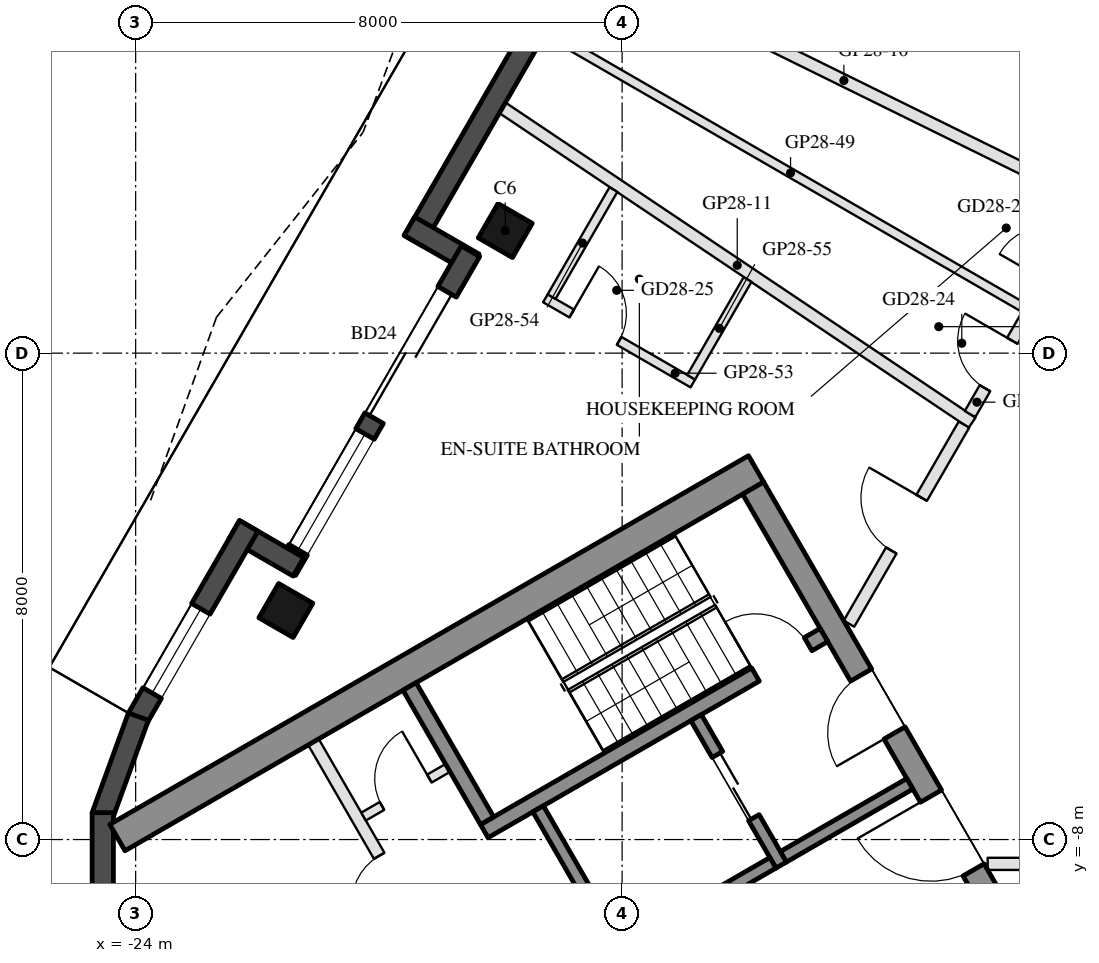
"""IFC4 building model, lengths in metres.
Left out: names, types, materials, properties, quantities, classifications, styles, units other than length and angle.
Written with IfcOpenShell. Run it as: python <this file> out.ifc"""

import sys

from ifc_helpers import new_model, si_unit, direction, frame, frame_2d, origin, origin_2d, place, context, subcontext, project, spatial, rectangle, hollow_rectangle, extrude, boolean, halfspace, element, fill, save


model = new_model("IFC4")
c1 = context("Model", 3, precision=1e-05, world=origin(), true_north=direction((0.0, 1.0)))
c2 = subcontext(c1, "Body", "Model", "MODEL_VIEW")
j1 = project(units=[si_unit("LENGTHUNIT", "METRE"), si_unit("PLANEANGLEUNIT", "RADIAN")], contexts=[c1])
p1 = place(None, origin())
s1 = spatial("IfcSite", under=j1, at=p1, CompositionType="ELEMENT")
p2 = place(p1, origin())
s2 = spatial("IfcBuilding", under=s1, at=p2, CompositionType="ELEMENT")
p3 = place(p2, frame((0.0, 0.0, 280.0)))
s3 = spatial("IfcBuildingStorey", under=s2, at=p3, CompositionType="ELEMENT", Elevation=280.0)
p4 = place(p3, frame((-17.922, 2.016, 0.0), z_axis=(0.0, 0.0, 1.0), x_axis=(0.5, 0.866025403784, 0.0)))
e1 = element("IfcColumn", 1, at=p4, inside=s3, PredefinedType="COLUMN", context=c2, shape_type="SweptSolid", body=[
    boolean("DIFFERENCE", extrude(hollow_rectangle(XDim=0.65, YDim=0.65, WallThickness=0.03, at=origin_2d()), origin(), (0.0, 0.0, 1.0), 3.7), halfspace(frame((0.0, 0.0, 0.04), z_axis=(0.0, 0.0, 1.0), x_axis=(1.0, 0.0, 0.0)), True)),
])
p5 = place(p3, frame((-21.53, -4.233, 0.0), z_axis=(0.0, 0.0, 1.0), x_axis=(0.5, 0.866025403784, 0.0)))
e2 = element("IfcColumn", 2, at=p5, inside=s3, PredefinedType="COLUMN", context=c2, shape_type="SweptSolid", body=[
    boolean("DIFFERENCE", extrude(hollow_rectangle(XDim=0.65, YDim=0.65, WallThickness=0.03, at=origin_2d()), origin(), (0.0, 0.0, 1.0), 3.7), halfspace(frame((0.0, 0.0, 0.047), z_axis=(0.0, 0.0, 1.0), x_axis=(1.0, 0.0, 0.0)), True)),
])
p6 = place(p3, frame((-14.925, 9.656, 0.0), z_axis=(0.0, 0.0, 1.0), x_axis=(-0.500018599098, -0.866014665324, 0.0)))
e3 = element("IfcWall", 3, at=p6, inside=s3, PredefinedType="SOLIDWALL", context=c2, shape_type="SweptSolid", body=[
    extrude(rectangle(XDim=9.015, YDim=0.35, at=frame_2d((4.508, 0.0))), origin(), (0.0, 0.0, 1.0), 3.55),
])
p7 = place(p6, frame((1.613, 0.0, 0.0)))
e4 = element("IfcOpeningElement", 4, at=p7, cuts=e3, PredefinedType="OPENING", context=c2, shape_type="SweptSolid", body=[
    extrude(rectangle(XDim=1.4, YDim=2.4, at=frame_2d((0.7, 1.2))), frame((0.0, 0.185, 0.0), z_axis=(0.0, -1.0, 0.0), x_axis=(1.0, 0.0, 0.0)), (0.0, 0.0, 1.0), 0.37),
])
p8 = place(p3, frame((-19.497, 2.088, 0.0), z_axis=(0.0, 0.0, 1.0), x_axis=(0.866005645448, -0.500034220881, 0.0)))
e5 = element("IfcWall", 5, at=p8, inside=s3, PredefinedType="SOLIDWALL", context=c2, shape_type="SweptSolid", body=[
    extrude(rectangle(XDim=1.22, YDim=0.35, at=frame_2d((0.61, 0.0))), origin(), (0.0, 0.0, 1.0), 3.55),
])
p9 = place(p3, frame((-18.493, 1.676, 0.0), z_axis=(0.0, 0.0, 1.0), x_axis=(-0.499985371027, -0.866033849661, 0.0)))
e6 = element("IfcWall", 6, at=p9, inside=s3, PredefinedType="SOLIDWALL", context=c2, shape_type="SweptSolid", body=[
    extrude(rectangle(XDim=6.055, YDim=0.35, at=frame_2d((3.028, 0.0))), origin(), (0.0, 0.0, 1.0), 3.55),
])
p10 = place(p9, frame((0.77, 0.0, 0.0)))
e7 = element("IfcOpeningElement", 7, at=p10, cuts=e6, PredefinedType="OPENING", context=c2, shape_type="SweptSolid", body=[
    extrude(rectangle(XDim=2.4, YDim=2.4, at=frame_2d((1.2, 1.2))), frame((0.0, 0.185, 0.0), z_axis=(0.0, -1.0, 0.0), x_axis=(1.0, 0.0, 0.0)), (0.0, 0.0, 1.0), 0.37),
])
p11 = place(p9, frame((3.47, 0.0, 0.3)))
e8 = element("IfcOpeningElement", 8, at=p11, cuts=e6, PredefinedType="OPENING", context=c2, shape_type="SweptSolid", body=[
    extrude(rectangle(XDim=2.2, YDim=2.65, at=frame_2d((1.1, 1.325))), frame((0.0, 0.185, 0.0), z_axis=(0.0, -1.0, 0.0), x_axis=(1.0, 0.0, 0.0)), (0.0, 0.0, 1.0), 0.37),
])
p12 = place(p3, frame((-21.323, -3.515, 0.0), z_axis=(0.0, 0.0, 1.0), x_axis=(-0.866092288191, 0.499884134912, 0.0)))
e9 = element("IfcWall", 9, at=p12, inside=s3, PredefinedType="SOLIDWALL", context=c2, shape_type="SweptSolid", body=[
    extrude(rectangle(XDim=1.22, YDim=0.35, at=frame_2d((0.61, 0.0))), origin(), (0.0, 0.0, 1.0), 3.55),
])
p13 = place(p3, frame((-22.14, -2.841, 0.0), z_axis=(0.0, 0.0, 1.0), x_axis=(-0.500040506767, -0.866002015928, 0.0)))
e10 = element("IfcWall", 10, at=p13, inside=s3, PredefinedType="SOLIDWALL", context=c2, shape_type="SweptSolid", body=[
    extrude(rectangle(XDim=3.655, YDim=0.35, at=frame_2d((1.827, 0.0))), origin(), (0.0, 0.0, 1.0), 3.55),
])
p14 = place(p13, frame((1.575, 0.0, 0.3)))
e11 = element("IfcOpeningElement", 11, at=p14, cuts=e10, PredefinedType="OPENING", context=c2, shape_type="SweptSolid", body=[
    extrude(rectangle(XDim=1.6, YDim=2.65, at=frame_2d((0.8, 1.325))), frame((0.0, 0.185, 0.0), z_axis=(0.0, -1.0, 0.0), x_axis=(1.0, 0.0, 0.0)), (0.0, 0.0, 1.0), 0.37),
])
for number, where, z_axis, x_axis in (
    (12, (-23.955, -5.978, 0.0), (0.0, 0.0, 1.0), (-0.342, -0.94, 0.0)),
    (13, (-24.541, -7.558, 0.0), (0.0, 0.0, 1.0), (0.0, -1.0, 0.0)),
):
    element("IfcWall", number, at=place(p3, frame(where, z_axis=z_axis, x_axis=x_axis)), inside=s3, PredefinedType="SOLIDWALL", context=c2, shape_type="SweptSolid", body=[
        extrude(rectangle(XDim=1.745, YDim=0.35, at=frame_2d((0.872, 0.0))), origin(), (0.0, 0.0, 1.0), 3.55),
    ])
p15 = place(p3, frame((-13.797, -1.903, 0.0), z_axis=(0.0, 0.0, 1.0), x_axis=(-0.866024688907, -0.500001238203, 0.0)))
e14 = element("IfcWall", 14, at=p15, inside=s3, PredefinedType="SHEAR", context=c2, shape_type="SweptSolid", body=[
    extrude(rectangle(XDim=12.129, YDim=0.5, at=frame_2d((6.064, 0.0))), origin(), (0.0, 0.0, 1.0), 3.5),
])
p16 = place(p3, frame((-13.845, -2.22, 0.0), z_axis=(0.0, 0.0, 1.0), x_axis=(0.500004234368, -0.866022959057, 0.0)))
e15 = element("IfcWall", 15, at=p16, inside=s3, PredefinedType="SHEAR", context=c2, shape_type="SweptSolid", body=[
    extrude(rectangle(XDim=10.0, YDim=0.4, at=frame_2d((5.0, 0.0))), origin(), (0.0, 0.0, 1.0), 3.5),
])
p17 = place(p16, frame((3.55, 0.0, 0.0)))
e16 = element("IfcOpeningElement", 16, at=p17, cuts=e15, PredefinedType="OPENING", context=c2, shape_type="SweptSolid", body=[
    extrude(rectangle(XDim=1.1, YDim=2.1, at=frame_2d((0.55, 1.05))), frame((0.0, 0.21, 0.0), z_axis=(0.0, -1.0, 0.0), x_axis=(1.0, 0.0, 0.0)), (0.0, 0.0, 1.0), 0.42),
])
p18 = place(p16, frame((5.85, 0.0, 0.0)))
e17 = element("IfcOpeningElement", 17, at=p18, cuts=e15, PredefinedType="OPENING", context=c2, shape_type="SweptSolid", body=[
    extrude(rectangle(XDim=1.4, YDim=2.1, at=frame_2d((0.7, 1.05))), frame((0.0, 0.21, 0.0), z_axis=(0.0, -1.0, 0.0), x_axis=(1.0, 0.0, 0.0)), (0.0, 0.0, 1.0), 0.42),
])
p19 = place(p3, frame((-12.681, -4.636, 0.0), z_axis=(0.0, 0.0, 1.0), x_axis=(-0.866021702275, -0.500006411147, 0.0)))
e18 = element("IfcWall", 18, at=p19, inside=s3, PredefinedType="SHEAR", context=c2, shape_type="SweptSolid", body=[
    extrude(rectangle(XDim=6.45, YDim=0.25, at=frame_2d((3.225, 0.0))), origin(), (0.0, 0.0, 1.0), 3.5),
])
p20 = place(p19, frame((0.3, 0.0, 0.0)))
e19 = element("IfcOpeningElement", 19, at=p20, cuts=e18, PredefinedType="OPENING", context=c2, shape_type="SweptSolid", body=[
    extrude(rectangle(XDim=1.0, YDim=2.1, at=frame_2d((0.5, 1.05))), frame((0.0, 0.135, 0.0), z_axis=(0.0, -1.0, 0.0), x_axis=(1.0, 0.0, 0.0)), (0.0, 0.0, 1.0), 0.27),
])
p21 = place(p3, frame((-19.496, -5.482, 0.0), z_axis=(0.0, 0.0, 1.0), x_axis=(0.499990435942, -0.866030925526, 0.0)))
e20 = element("IfcWall", 20, at=p21, inside=s3, PredefinedType="SHEAR", context=c2, shape_type="SweptSolid", body=[
    extrude(rectangle(XDim=2.55, YDim=0.25, at=frame_2d((1.275, 0.0))), origin(), (0.0, 0.0, 1.0), 3.5),
])
p22 = place(p3, frame((-17.381, -7.495, 0.0), z_axis=(0.0, 0.0, 1.0), x_axis=(0.500011755427, -0.866018616679, 0.0)))
e21 = element("IfcWall", 21, at=p22, inside=s3, PredefinedType="SHEAR", context=c2, shape_type="SweptSolid", body=[
    extrude(rectangle(XDim=2.8, YDim=0.2, at=frame_2d((1.4, 0.0))), origin(), (0.0, 0.0, 1.0), 3.5),
])
p23 = place(p3, frame((-14.783, -5.995, 0.0), z_axis=(0.0, 0.0, 1.0), x_axis=(0.49994636267, -0.866056369097, 0.0)))
e22 = element("IfcWall", 22, at=p23, inside=s3, PredefinedType="SHEAR", context=c2, shape_type="SweptSolid", body=[
    extrude(rectangle(XDim=2.8, YDim=0.2, at=frame_2d((1.4, 0.0))), origin(), (0.0, 0.0, 1.0), 3.5),
])
p24 = place(p23, frame((0.7, 0.0, 0.0)))
e23 = element("IfcOpeningElement", 23, at=p24, cuts=e22, PredefinedType="OPENING", context=c2, shape_type="SweptSolid", body=[
    extrude(rectangle(XDim=1.2, YDim=2.1, at=frame_2d((0.6, 1.05))), frame((0.0, 0.11, 0.0), z_axis=(0.0, -1.0, 0.0), x_axis=(1.0, 0.0, 0.0)), (0.0, 0.0, 1.0), 0.22),
])
p25 = place(p3, frame((-13.52, -8.383, 0.0), z_axis=(0.0, 0.0, 1.0), x_axis=(-0.866034573852, -0.49998411664, 0.0)))
e24 = element("IfcWall", 24, at=p25, inside=s3, PredefinedType="SHEAR", context=c2, shape_type="SweptSolid", body=[
    extrude(rectangle(XDim=2.8, YDim=0.2, at=frame_2d((1.4, 0.0))), origin(), (0.0, 0.0, 1.0), 3.5),
])
p26 = place(p3, frame((-11.268, -7.083, 0.0), z_axis=(0.0, 0.0, 1.0), x_axis=(-0.866050077142, -0.499957262057, 0.0)))
e25 = element("IfcWall", 25, at=p26, inside=s3, PredefinedType="SHEAR", context=c2, shape_type="SweptSolid", body=[
    extrude(rectangle(XDim=2.4, YDim=0.2, at=frame_2d((1.2, 0.0))), origin(), (0.0, 0.0, 1.0), 3.5),
])
p27 = place(p3, frame((-21.076, -6.395, 0.0), z_axis=(0.0, 0.0, 1.0), x_axis=(0.50001468107, -0.866016927499, 0.0)))
e26 = element("IfcWall", 26, at=p27, inside=s3, PredefinedType="PARTITIONING", context=c2, shape_type="SweptSolid", body=[
    extrude(rectangle(XDim=5.4, YDim=0.2, at=frame_2d((2.7, 0.0))), origin(), (0.0, 0.0, 1.0), 3.5),
])
p28 = place(p27, frame((2.163, 0.0, 0.0)))
e27 = element("IfcOpeningElement", 27, at=p28, cuts=e26, PredefinedType="OPENING", context=c2, shape_type="SweptSolid", body=[
    extrude(rectangle(XDim=0.9, YDim=2.1, at=frame_2d((0.45, 1.05))), frame((0.0, 0.11, 0.0), z_axis=(0.0, -1.0, 0.0), x_axis=(1.0, 0.0, 0.0)), (0.0, 0.0, 1.0), 0.22),
])
p29 = place(p27, frame((4.038, 0.0, 0.0)))
e28 = element("IfcOpeningElement", 28, at=p29, cuts=e26, PredefinedType="OPENING", context=c2, shape_type="SweptSolid", body=[
    extrude(rectangle(XDim=0.9, YDim=2.1, at=frame_2d((0.45, 1.05))), frame((0.0, 0.11, 0.0), z_axis=(0.0, -1.0, 0.0), x_axis=(1.0, 0.0, 0.0)), (0.0, 0.0, 1.0), 0.22),
])
p30 = place(p3, frame((-18.866, -6.822, 0.0), z_axis=(0.0, 0.0, 1.0), x_axis=(-0.866028054938, -0.499995408039, 0.0)))
e29 = element("IfcWall", 29, at=p30, inside=s3, PredefinedType="PARTITIONING", context=c2, shape_type="SweptSolid", body=[
    extrude(rectangle(XDim=1.6, YDim=0.15, at=frame_2d((0.8, 0.0))), origin(), (0.0, 0.0, 1.0), 3.5),
])
p31 = place(p30, frame((0.35, 0.0, 0.0)))
e30 = element("IfcOpeningElement", 30, at=p31, cuts=e29, PredefinedType="OPENING", context=c2, shape_type="SweptSolid", body=[
    extrude(rectangle(XDim=0.9, YDim=2.1, at=frame_2d((0.45, 1.05))), frame((0.0, 0.085, 0.0), z_axis=(0.0, -1.0, 0.0), x_axis=(1.0, 0.0, 0.0)), (0.0, 0.0, 1.0), 0.17),
])
p32 = place(p3, frame((-16.524, 6.538, 0.0), z_axis=(0.0, 0.0, 1.0), x_axis=(0.897120251728, -0.441786434762, 0.0)))
e31 = element("IfcWall", 31, at=p32, inside=s3, PredefinedType="PARTITIONING", context=c2, shape_type="SweptSolid", body=[
    extrude(rectangle(XDim=9.299, YDim=0.2, at=frame_2d((4.649, 0.0))), origin(), (0.0, 0.0, 1.0), 3.16),
])
p33 = place(p3, frame((-17.969, 4.035, 0.0), z_axis=(0.0, 0.0, 1.0), x_axis=(0.830560992963, -0.556927676604, 0.0)))
e32 = element("IfcWall", 32, at=p33, inside=s3, PredefinedType="PARTITIONING", context=c2, shape_type="SweptSolid", body=[
    extrude(rectangle(XDim=9.3, YDim=0.2, at=frame_2d((4.65, 0.0))), origin(), (0.0, 0.0, 1.0), 3.16),
])
p34 = place(p3, frame((-5.0, -8.4, 0.0), z_axis=(0.0, 0.0, 1.0), x_axis=(-1.0, 0.0, 0.0)))
e33 = element("IfcWall", 33, at=p34, inside=s3, PredefinedType="PARTITIONING", context=c2, shape_type="SweptSolid", body=[
    extrude(rectangle(XDim=4.988, YDim=0.2, at=frame_2d((2.494, 0.0))), origin(), (0.0, 0.0, 1.0), 3.05),
])
p35 = place(p34, frame((2.05, 0.0, 0.0)))
e34 = element("IfcOpeningElement", 34, at=p35, cuts=e33, PredefinedType="OPENING", context=c2, shape_type="SweptSolid", body=[
    extrude(rectangle(XDim=1.0, YDim=2.1, at=frame_2d((0.5, 1.05))), frame((0.0, 0.11, 0.0), z_axis=(0.0, -1.0, 0.0), x_axis=(1.0, 0.0, 0.0)), (0.0, 0.0, 1.0), 0.22),
])
p36 = place(p3, frame((-9.795, 5.634, 0.0), z_axis=(0.0, 0.0, 1.0), x_axis=(0.866034573852, -0.49998411664, 0.0)))
e35 = element("IfcWall", 35, at=p36, inside=s3, PredefinedType="PARTITIONING", context=c2, shape_type="SweptSolid", body=[
    extrude(rectangle(XDim=2.8, YDim=0.15, at=frame_2d((1.4, 0.0))), origin(), (0.0, 0.0, 1.0), 3.05),
])
p37 = place(p36, frame((0.5, 0.0, 0.0)))
e36 = element("IfcOpeningElement", 36, at=p37, cuts=e35, PredefinedType="OPENING", context=c2, shape_type="SweptSolid", body=[
    extrude(rectangle(XDim=0.9, YDim=2.1, at=frame_2d((0.45, 1.05))), frame((0.0, 0.085, 0.0), z_axis=(0.0, -1.0, 0.0), x_axis=(1.0, 0.0, 0.0)), (0.0, 0.0, 1.0), 0.17),
])
p38 = place(p3, frame((-17.246, 5.286, 0.0), z_axis=(0.0, 0.0, 1.0), x_axis=(0.865746766399, -0.500482303853, 0.0)))
e37 = element("IfcWall", 37, at=p38, inside=s3, PredefinedType="PARTITIONING", context=c2, shape_type="SweptSolid", body=[
    extrude(rectangle(XDim=9.279, YDim=0.15, at=frame_2d((4.639, 0.0))), origin(), (0.0, 0.0, 1.0), 3.16),
])
p39 = place(p3, frame((-10.278, -1.002, 0.0), z_axis=(0.0, 0.0, 1.0), x_axis=(0.499977061294, 0.866038647048, 0.0)))
e38 = element("IfcWall", 38, at=p39, inside=s3, PredefinedType="PARTITIONING", context=c2, shape_type="SweptSolid", body=[
    extrude(rectangle(XDim=1.881, YDim=0.2, at=frame_2d((0.941, 0.0))), origin(), (0.0, 0.0, 1.0), 3.55),
])
p40 = place(p39, frame((0.491, 0.0, 0.0)))
e39 = element("IfcOpeningElement", 39, at=p40, cuts=e38, PredefinedType="OPENING", context=c2, shape_type="SweptSolid", body=[
    extrude(rectangle(XDim=0.9, YDim=2.1, at=frame_2d((0.45, 1.05))), frame((0.0, 0.11, 0.0), z_axis=(0.0, -1.0, 0.0), x_axis=(1.0, 0.0, 0.0)), (0.0, 0.0, 1.0), 0.22),
])
p41 = place(p3, frame((-12.269, -4.45, 0.0), z_axis=(0.0, 0.0, 1.0), x_axis=(0.500000040646, 0.866025380318, 0.0)))
e40 = element("IfcWall", 40, at=p41, inside=s3, PredefinedType="PARTITIONING", context=c2, shape_type="SweptSolid", body=[
    extrude(rectangle(XDim=3.781, YDim=0.2, at=frame_2d((1.891, 0.0))), origin(), (0.0, 0.0, 1.0), 3.05),
])
p42 = place(p41, frame((1.391, 0.0, 0.0)))
e41 = element("IfcOpeningElement", 41, at=p42, cuts=e40, PredefinedType="OPENING", context=c2, shape_type="SweptSolid", body=[
    extrude(rectangle(XDim=1.0, YDim=2.1, at=frame_2d((0.5, 1.05))), frame((0.0, 0.11, 0.0), z_axis=(0.0, -1.0, 0.0), x_axis=(1.0, 0.0, 0.0)), (0.0, 0.0, 1.0), 0.22),
])
p43 = place(p3, frame((-17.262, 0.902, 0.0), z_axis=(0.0, 0.0, 1.0), x_axis=(0.866034573852, -0.49998411664, 0.0)))
e42 = element("IfcWall", 42, at=p43, inside=s3, PredefinedType="PARTITIONING", context=c2, shape_type="SweptSolid", body=[
    extrude(rectangle(XDim=2.8, YDim=0.15, at=frame_2d((1.4, 0.0))), origin(), (0.0, 0.0, 1.0), 3.55),
])
p44 = place(p43, frame((0.5, 0.0, 0.0)))
e43 = element("IfcOpeningElement", 43, at=p44, cuts=e42, PredefinedType="OPENING", context=c2, shape_type="SweptSolid", body=[
    extrude(rectangle(XDim=0.9, YDim=2.1, at=frame_2d((0.45, 1.05))), frame((0.0, 0.085, 0.0), z_axis=(0.0, -1.0, 0.0), x_axis=(1.0, 0.0, 0.0)), (0.0, 0.0, 1.0), 0.17),
])
p45 = place(p3, frame((-16.143, 2.69, 0.0), z_axis=(0.0, 0.0, 1.0), x_axis=(-0.500013496215, -0.866017611601, 0.0)))
e44 = element("IfcWall", 44, at=p45, inside=s3, PredefinedType="PARTITIONING", context=c2, shape_type="SweptSolid", body=[
    extrude(rectangle(XDim=2.033, YDim=0.15, at=frame_2d((1.017, 0.0))), origin(), (0.0, 0.0, 1.0), 3.05),
])
p46 = place(p3, frame((-13.937, 1.211, 0.0), z_axis=(0.0, 0.0, 1.0), x_axis=(-0.500003477455, -0.866023396066, 0.0)))
e45 = element("IfcWall", 45, at=p46, inside=s3, PredefinedType="PARTITIONING", context=c2, shape_type="SweptSolid", body=[
    extrude(rectangle(XDim=1.855, YDim=0.15, at=frame_2d((0.927, 0.0))), origin(), (0.0, 0.0, 1.0), 3.05),
])
p47 = place(p10, frame((2.4, 0.0, 0.0), z_axis=(0.0, 0.0, 1.0), x_axis=(-1.0, 0.0, 0.0)))
e46 = element("IfcDoor", 46, at=p47, inside=s3, OperationType="SLIDING_TO_LEFT", PredefinedType="DOOR", context=c2, shape_type="SweptSolid", body=[
    extrude(rectangle(XDim=2.4, YDim=2.4, at=frame_2d((1.2, 1.2))), frame((0.0, 0.025, 0.0), z_axis=(0.0, -1.0, 0.0), x_axis=(1.0, 0.0, 0.0)), (0.0, 0.0, 1.0), 0.05),
])
fill(e7, e46)
p48 = place(p11, origin())
e47 = element("IfcWindow", 47, at=p48, inside=s3, PartitioningType="SINGLE_PANEL", PredefinedType="WINDOW", context=c2, shape_type="SweptSolid", body=[
    extrude(rectangle(XDim=2.2, YDim=2.65, at=frame_2d((1.1, 1.325))), frame((0.0, 0.03, 0.0), z_axis=(0.0, -1.0, 0.0), x_axis=(1.0, 0.0, 0.0)), (0.0, 0.0, 1.0), 0.06),
])
fill(e8, e47)
p49 = place(p14, origin())
e48 = element("IfcWindow", 48, at=p49, inside=s3, PartitioningType="SINGLE_PANEL", PredefinedType="WINDOW", context=c2, shape_type="SweptSolid", body=[
    extrude(rectangle(XDim=1.6, YDim=2.65, at=frame_2d((0.8, 1.325))), frame((0.0, 0.03, 0.0), z_axis=(0.0, -1.0, 0.0), x_axis=(1.0, 0.0, 0.0)), (0.0, 0.0, 1.0), 0.06),
])
fill(e11, e48)
p50 = place(p24, origin())
e49 = element("IfcDoor", 49, at=p50, inside=s3, OperationType="DOUBLE_DOOR_SLIDING", PredefinedType="DOOR", context=c2, shape_type="SweptSolid", body=[
    extrude(rectangle(XDim=1.2, YDim=2.1, at=frame_2d((0.6, 1.05))), frame((0.0, 0.025, 0.0), z_axis=(0.0, -1.0, 0.0), x_axis=(1.0, 0.0, 0.0)), (0.0, 0.0, 1.0), 0.05),
])
fill(e23, e49)
p51 = place(p31, frame((0.9, 0.0, 0.0), z_axis=(0.0, 0.0, 1.0), x_axis=(-1.0, 0.0, 0.0)))
e50 = element("IfcDoor", 50, at=p51, inside=s3, OperationType="SINGLE_SWING_RIGHT", PredefinedType="DOOR", context=c2, shape_type="SweptSolid", body=[
    extrude(rectangle(XDim=0.9, YDim=2.1, at=frame_2d((0.45, 1.05))), frame((0.0, 0.025, 0.0), z_axis=(0.0, -1.0, 0.0), x_axis=(1.0, 0.0, 0.0)), (0.0, 0.0, 1.0), 0.05),
])
fill(e30, e50)
p52 = place(p28, frame((0.9, 0.0, 0.0), z_axis=(0.0, 0.0, 1.0), x_axis=(-1.0, 0.0, 0.0)))
e51 = element("IfcDoor", 51, at=p52, inside=s3, OperationType="SINGLE_SWING_LEFT", PredefinedType="DOOR", context=c2, shape_type="SweptSolid", body=[
    extrude(rectangle(XDim=0.9, YDim=2.1, at=frame_2d((0.45, 1.05))), frame((0.0, 0.025, 0.0), z_axis=(0.0, -1.0, 0.0), x_axis=(1.0, 0.0, 0.0)), (0.0, 0.0, 1.0), 0.05),
])
fill(e27, e51)
p53 = place(p17, frame((1.1, 0.0, 0.0), z_axis=(0.0, 0.0, 1.0), x_axis=(-1.0, 0.0, 0.0)))
e52 = element("IfcDoor", 52, at=p53, inside=s3, OperationType="SINGLE_SWING_LEFT", PredefinedType="DOOR", context=c2, shape_type="SweptSolid", body=[
    extrude(rectangle(XDim=1.1, YDim=2.1, at=frame_2d((0.55, 1.05))), frame((0.0, 0.025, 0.0), z_axis=(0.0, -1.0, 0.0), x_axis=(1.0, 0.0, 0.0)), (0.0, 0.0, 1.0), 0.05),
])
fill(e16, e52)
p54 = place(p18, frame((1.4, 0.0, 0.0), z_axis=(0.0, 0.0, 1.0), x_axis=(-1.0, 0.0, 0.0)))
e53 = element("IfcDoor", 53, at=p54, inside=s3, OperationType="DOUBLE_DOOR_SINGLE_SWING", PredefinedType="DOOR", context=c2, shape_type="SweptSolid", body=[
    extrude(rectangle(XDim=1.4, YDim=2.1, at=frame_2d((0.7, 1.05))), frame((0.0, 0.025, 0.0), z_axis=(0.0, -1.0, 0.0), x_axis=(1.0, 0.0, 0.0)), (0.0, 0.0, 1.0), 0.05),
])
fill(e17, e53)
p55 = place(p20, frame((1.0, 0.0, 0.0), z_axis=(0.0, 0.0, 1.0), x_axis=(-1.0, 0.0, 0.0)))
e54 = element("IfcDoor", 54, at=p55, inside=s3, OperationType="SINGLE_SWING_LEFT", PredefinedType="DOOR", context=c2, shape_type="SweptSolid", body=[
    extrude(rectangle(XDim=1.0, YDim=2.1, at=frame_2d((0.5, 1.05))), frame((0.0, 0.025, 0.0), z_axis=(0.0, -1.0, 0.0), x_axis=(1.0, 0.0, 0.0)), (0.0, 0.0, 1.0), 0.05),
])
fill(e19, e54)
p56 = place(p40, origin())
e55 = element("IfcDoor", 55, at=p56, inside=s3, OperationType="SINGLE_SWING_RIGHT", PredefinedType="DOOR", context=c2, shape_type="SweptSolid", body=[
    extrude(rectangle(XDim=0.9, YDim=2.1, at=frame_2d((0.45, 1.05))), frame((0.0, 0.025, 0.0), z_axis=(0.0, -1.0, 0.0), x_axis=(1.0, 0.0, 0.0)), (0.0, 0.0, 1.0), 0.05),
])
fill(e39, e55)
p57 = place(p44, origin())
e56 = element("IfcDoor", 56, at=p57, inside=s3, OperationType="SINGLE_SWING_LEFT", PredefinedType="DOOR", context=c2, shape_type="SweptSolid", body=[
    extrude(rectangle(XDim=0.9, YDim=2.1, at=frame_2d((0.45, 1.05))), frame((0.0, 0.025, 0.0), z_axis=(0.0, -1.0, 0.0), x_axis=(1.0, 0.0, 0.0)), (0.0, 0.0, 1.0), 0.05),
])
fill(e43, e56)
p58 = place(p42, origin())
e57 = element("IfcDoor", 57, at=p58, inside=s3, OperationType="SINGLE_SWING_RIGHT", PredefinedType="DOOR", context=c2, shape_type="SweptSolid", body=[
    extrude(rectangle(XDim=1.0, YDim=2.1, at=frame_2d((0.5, 1.05))), frame((0.0, 0.025, 0.0), z_axis=(0.0, -1.0, 0.0), x_axis=(1.0, 0.0, 0.0)), (0.0, 0.0, 1.0), 0.05),
])
fill(e41, e57)
save(model, sys.argv[1])
